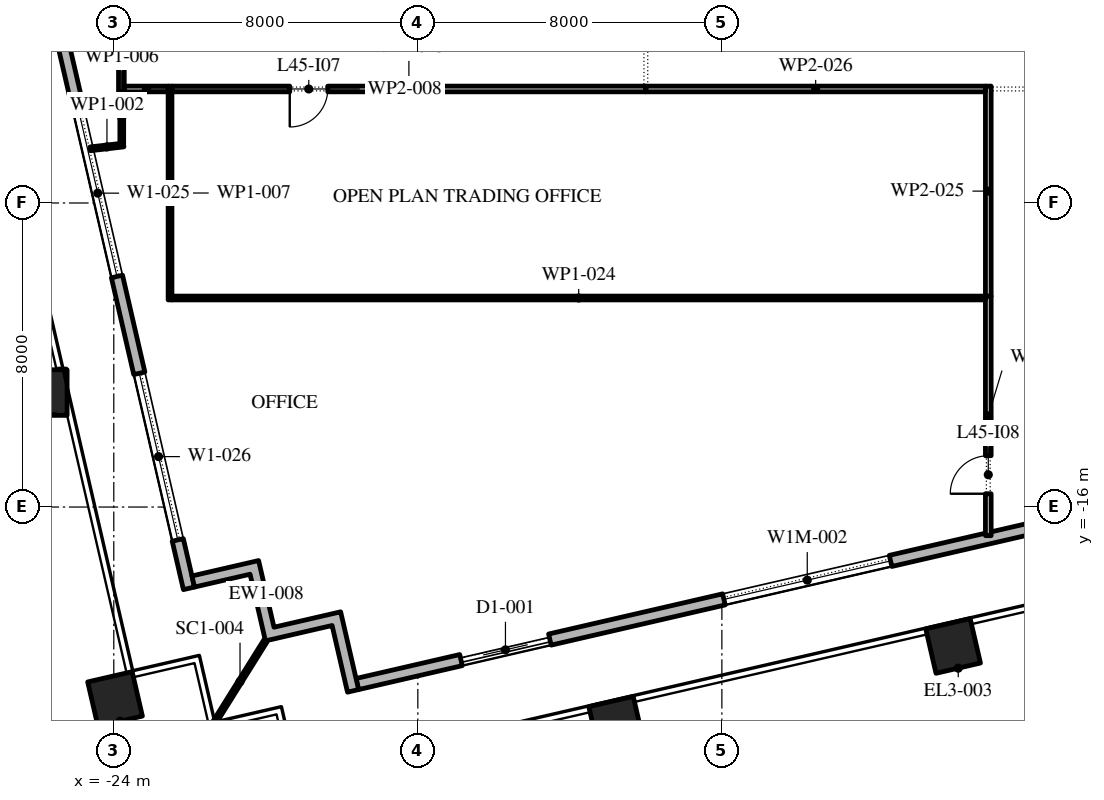
"""IFC4 building model, lengths in metres.
Left out: names, types, materials, properties, quantities, classifications, styles, units other than length and angle.
Written with IfcOpenShell. Run it as: python <this file> out.ifc"""

import sys

from ifc_helpers import new_model, si_unit, direction, frame, frame_2d, origin, origin_2d, place, context, subcontext, project, spatial, polyline, rectangle, outline, extrude, element, fill, save


model = new_model("IFC4")
c1 = context("Model", 3, precision=1e-05, world=origin(), true_north=direction((0.0, 1.0)))
c2 = subcontext(c1, "Body", "Model", "MODEL_VIEW")
j1 = project(units=[si_unit("LENGTHUNIT", "METRE"), si_unit("PLANEANGLEUNIT", "RADIAN")], contexts=[c1])
p1 = place(None, origin())
s1 = spatial("IfcSite", under=j1, at=p1, CompositionType="ELEMENT")
p2 = place(p1, origin())
s2 = spatial("IfcBuilding", under=s1, at=p2, CompositionType="ELEMENT")
p3 = place(p2, frame((0.0, 0.0, 205.2)))
s3 = spatial("IfcBuildingStorey", under=s2, at=p3, CompositionType="ELEMENT", Elevation=205.2)
for number, where, z_axis, x_axis in (
    (1, (-10.782, -21.702, 0.0), (0.0, 0.0, 1.0), (0.974, 0.225, 0.0)),
    (2, (-1.916, -19.655, 0.0), (0.0, 0.0, 1.0), (0.974, 0.225, 0.0)),
):
    element("IfcColumn", number, at=place(p3, frame(where, z_axis=z_axis, x_axis=x_axis)), inside=s3, PredefinedType="COLUMN", context=c2, shape_type="SweptSolid", body=[
        extrude(rectangle(XDim=1.2, YDim=1.2, at=origin_2d()), origin(), (0.0, 0.0, 1.0), 4.2),
    ])
p4 = place(p3, frame((-25.828, -12.988, 0.0), z_axis=(-0.002731884952, 0.01168316756, 0.999928017609), x_axis=(-0.973733900744, -0.227689021567, 0.0)))
e3 = element("IfcColumn", 3, at=p4, inside=s3, PredefinedType="COLUMN", context=c2, shape_type="SweptSolid", body=[
    extrude(rectangle(XDim=1.2, YDim=1.2, at=origin_2d()), origin(), (0.0, 0.0, 1.0), 4.2),
])
p5 = place(p3, frame((-23.967, -21.051, 0.0), z_axis=(0.0, 0.0, 1.0), x_axis=(0.974370064785, 0.224951054344, 0.0)))
e4 = element("IfcColumn", 4, at=p5, inside=s3, PredefinedType="COLUMN", context=c2, shape_type="SweptSolid", body=[
    extrude(rectangle(XDim=1.2, YDim=1.2, at=origin_2d()), origin(), (0.0, 0.0, 1.0), 4.2),
])
p6 = place(p3, frame((-17.592, -20.657, 0.0), z_axis=(0.0, 0.0, 1.0), x_axis=(0.974370243697, 0.224950279389, 0.0)))
e5 = element("IfcWall", 5, at=p6, inside=s3, PredefinedType="STANDARD", context=c2, shape_type="SweptSolid", body=[
    extrude(rectangle(XDim=49.5, YDim=0.3, at=frame_2d((24.75, 0.0))), origin(), (0.0, 0.0, 1.0), 4.0),
])
p7 = place(p6, frame((2.8, 0.0, 0.0)))
e6 = element("IfcOpeningElement", 6, at=p7, cuts=e5, PredefinedType="OPENING", context=c2, shape_type="SweptSolid", body=[
    extrude(rectangle(XDim=2.4, YDim=3.5, at=frame_2d((1.2, 1.75))), frame((0.0, 0.16, 0.0), z_axis=(0.0, -1.0, 0.0), x_axis=(1.0, 0.0, 0.0)), (0.0, 0.0, 1.0), 0.32),
])
p8 = place(p6, frame((9.9, 0.0, 0.45)))
e7 = element("IfcOpeningElement", 7, at=p8, cuts=e5, PredefinedType="OPENING", context=c2, shape_type="SweptSolid", body=[
    extrude(rectangle(XDim=4.5, YDim=2.575, at=frame_2d((2.25, 1.288))), frame((0.0, 0.16, 0.0), z_axis=(0.0, -1.0, 0.0), x_axis=(1.0, 0.0, 0.0)), (0.0, 0.0, 1.0), 0.32),
])
p9 = place(p6, frame((18.2, 0.0, 0.45)))
e8 = element("IfcOpeningElement", 8, at=p9, cuts=e5, PredefinedType="OPENING", context=c2, shape_type="SweptSolid", body=[
    extrude(rectangle(XDim=4.5, YDim=3.05, at=frame_2d((2.25, 1.525))), frame((0.0, 0.16, 0.0), z_axis=(0.0, -1.0, 0.0), x_axis=(1.0, 0.0, 0.0)), (0.0, 0.0, 1.0), 0.32),
])
p10 = place(p6, frame((26.5, 0.0, 0.45)))
e9 = element("IfcOpeningElement", 9, at=p10, cuts=e5, PredefinedType="OPENING", context=c2, shape_type="SweptSolid", body=[
    extrude(rectangle(XDim=4.5, YDim=2.75, at=frame_2d((2.25, 1.375))), frame((0.0, 0.16, 0.0), z_axis=(0.0, -1.0, 0.0), x_axis=(1.0, 0.0, 0.0)), (0.0, 0.0, 1.0), 0.32),
])
p11 = place(p6, frame((36.8, 0.0, 0.0)))
e10 = element("IfcOpeningElement", 10, at=p11, cuts=e5, PredefinedType="OPENING", context=c2, shape_type="SweptSolid", body=[
    extrude(rectangle(XDim=2.4, YDim=3.275, at=frame_2d((1.2, 1.637))), frame((0.0, 0.16, 0.0), z_axis=(0.0, -1.0, 0.0), x_axis=(1.0, 0.0, 0.0)), (0.0, 0.0, 1.0), 0.32),
])
p12 = place(p6, frame((43.1, 0.0, 0.45)))
e11 = element("IfcOpeningElement", 11, at=p12, cuts=e5, PredefinedType="OPENING", context=c2, shape_type="SweptSolid", body=[
    extrude(rectangle(XDim=4.5, YDim=2.875, at=frame_2d((2.25, 1.438))), frame((0.0, 0.16, 0.0), z_axis=(0.0, -1.0, 0.0), x_axis=(1.0, 0.0, 0.0)), (0.0, 0.0, 1.0), 0.32),
])
p13 = place(p3, frame((-33.157, 30.092, 0.0), z_axis=(0.0, 0.0, 1.0), x_axis=(0.224950279389, -0.974370243697, 0.0)))
e12 = element("IfcWall", 12, at=p13, inside=s3, PredefinedType="STANDARD", context=c2, shape_type="SweptSolid", body=[
    extrude(rectangle(XDim=49.5, YDim=0.3, at=frame_2d((24.75, 0.0))), origin(), (0.0, 0.0, 1.0), 4.0),
])
p14 = place(p13, frame((2.207, 0.0, 0.0)))
e13 = element("IfcOpeningElement", 13, at=p14, cuts=e12, PredefinedType="OPENING", context=c2, shape_type="SweptSolid", body=[
    extrude(rectangle(XDim=2.4, YDim=3.5, at=frame_2d((1.2, 1.75))), frame((0.0, 0.16, 0.0), z_axis=(0.0, -1.0, 0.0), x_axis=(1.0, 0.0, 0.0)), (0.0, 0.0, 1.0), 0.32),
])
p15 = place(p13, frame((8.121, 0.0, 0.45)))
e14 = element("IfcOpeningElement", 14, at=p15, cuts=e12, PredefinedType="OPENING", context=c2, shape_type="SweptSolid", body=[
    extrude(rectangle(XDim=4.5, YDim=2.825, at=frame_2d((2.25, 1.413))), frame((0.0, 0.16, 0.0), z_axis=(0.0, -1.0, 0.0), x_axis=(1.0, 0.0, 0.0)), (0.0, 0.0, 1.0), 0.32),
])
p16 = place(p13, frame((15.236, 0.0, 0.45)))
e15 = element("IfcOpeningElement", 15, at=p16, cuts=e12, PredefinedType="OPENING", context=c2, shape_type="SweptSolid", body=[
    extrude(rectangle(XDim=4.5, YDim=2.95, at=frame_2d((2.25, 1.475))), frame((0.0, 0.16, 0.0), z_axis=(0.0, -1.0, 0.0), x_axis=(1.0, 0.0, 0.0)), (0.0, 0.0, 1.0), 0.32),
])
p17 = place(p13, frame((22.35, 0.0, 0.45)))
e16 = element("IfcOpeningElement", 16, at=p17, cuts=e12, PredefinedType="OPENING", context=c2, shape_type="SweptSolid", body=[
    extrude(rectangle(XDim=4.5, YDim=3.0, at=frame_2d((2.25, 1.5))), frame((0.0, 0.16, 0.0), z_axis=(0.0, -1.0, 0.0), x_axis=(1.0, 0.0, 0.0)), (0.0, 0.0, 1.0), 0.32),
])
p18 = place(p13, frame((30.514, 0.0, 0.0)))
e17 = element("IfcOpeningElement", 17, at=p18, cuts=e12, PredefinedType="OPENING", context=c2, shape_type="SweptSolid", body=[
    extrude(rectangle(XDim=2.4, YDim=3.5, at=frame_2d((1.2, 1.75))), frame((0.0, 0.16, 0.0), z_axis=(0.0, -1.0, 0.0), x_axis=(1.0, 0.0, 0.0)), (0.0, 0.0, 1.0), 0.32),
])
p19 = place(p13, frame((36.579, 0.0, 0.45)))
e18 = element("IfcOpeningElement", 18, at=p19, cuts=e12, PredefinedType="OPENING", context=c2, shape_type="SweptSolid", body=[
    extrude(rectangle(XDim=4.5, YDim=3.05, at=frame_2d((2.25, 1.525))), frame((0.0, 0.16, 0.0), z_axis=(0.0, -1.0, 0.0), x_axis=(1.0, 0.0, 0.0)), (0.0, 0.0, 1.0), 0.32),
])
p20 = place(p13, frame((43.693, 0.0, 0.45)))
e19 = element("IfcOpeningElement", 19, at=p20, cuts=e12, PredefinedType="OPENING", context=c2, shape_type="SweptSolid", body=[
    extrude(rectangle(XDim=4.5, YDim=3.05, at=frame_2d((2.25, 1.525))), frame((0.0, 0.16, 0.0), z_axis=(0.0, -1.0, 0.0), x_axis=(1.0, 0.0, 0.0)), (0.0, 0.0, 1.0), 0.32),
])
p21 = place(p3, origin())
e20 = element("IfcWall", 20, at=p21, inside=s3, PredefinedType="STANDARD", context=c2, shape_type="SweptSolid", body=[
    extrude(outline(polyline([(-18.256, -19.117), (-20.01, -19.522), (-20.414, -17.768), (-21.876, -18.105), (-21.943, -17.813), (-20.19, -17.408), (-19.785, -19.162), (-18.031, -18.757), (-17.558, -20.803), (-17.851, -20.871), (-18.256, -19.117)])), origin(), (0.0, 0.0, 1.0), 4.0),
])
p22 = place(p3, frame((-20.01, -19.522, -0.05), z_axis=(0.0, 0.0, 1.0), x_axis=(-0.529920736377, -0.848047176257, 0.0)))
e21 = element("IfcWall", 21, at=p22, inside=s3, PredefinedType="STANDARD", context=c2, shape_type="SweptSolid", body=[
    extrude(rectangle(XDim=2.526, YDim=0.1, at=frame_2d((1.263, 0.0))), origin(), (0.0, 0.0, 1.0), 4.05),
])
p23 = place(p3, frame((-24.62, -6.575, 0.0), z_axis=(0.0, 0.0, 1.0), x_axis=(0.993501545499, 0.113818623659, 0.0)))
e22 = element("IfcWall", 22, at=p23, inside=s3, PredefinedType="PARTITIONING", context=c2, shape_type="SweptSolid", body=[
    extrude(rectangle(XDim=0.886, YDim=0.1, at=frame_2d((0.443, 0.0))), origin(), (0.0, 0.0, 1.0), 4.0),
])
p24 = place(p3, frame((-23.8, -5.075, 0.0), z_axis=(0.0, 0.0, 1.0), x_axis=(0.0, 1.0, 0.0)))
e23 = element("IfcWall", 23, at=p24, inside=s3, PredefinedType="PARTITIONING", context=c2, shape_type="SweptSolid", body=[
    extrude(rectangle(XDim=27.335, YDim=0.15, at=frame_2d((13.667, 0.0))), origin(), (0.0, 0.0, 1.0), 4.0),
])
p25 = place(p24, frame((15.985, 0.0, 0.0)))
e24 = element("IfcOpeningElement", 24, at=p25, cuts=e23, PredefinedType="OPENING", context=c2, shape_type="SweptSolid", body=[
    extrude(rectangle(XDim=1.0, YDim=2.1, at=frame_2d((0.5, 1.05))), frame((0.0, 0.085, 0.0), z_axis=(0.0, -1.0, 0.0), x_axis=(1.0, 0.0, 0.0)), (0.0, 0.0, 1.0), 0.17),
])
p26 = place(p3, frame((-23.79, -5.075, 0.0), z_axis=(0.0, 0.0, 1.0), x_axis=(0.0, -1.0, 0.0)))
e25 = element("IfcWall", 25, at=p26, inside=s3, PredefinedType="PARTITIONING", context=c2, shape_type="SweptSolid", body=[
    extrude(rectangle(XDim=1.355, YDim=0.1, at=frame_2d((0.677, 0.0))), origin(), (0.0, 0.0, 1.0), 4.0),
])
p27 = place(p3, frame((-22.52, -10.55, 0.0), z_axis=(0.0, 0.0, 1.0), x_axis=(0.0, 1.0, 0.0)))
e26 = element("IfcWall", 26, at=p27, inside=s3, PredefinedType="PARTITIONING", context=c2, shape_type="SweptSolid", body=[
    extrude(rectangle(XDim=5.625, YDim=0.1, at=frame_2d((2.812, 0.0))), origin(), (0.0, 0.0, 1.0), 4.0),
])
p28 = place(p3, frame((-22.57, -5.0, 0.0), z_axis=(0.0, 0.0, 1.0), x_axis=(-1.0, 0.0, 0.0)))
e27 = element("IfcWall", 27, at=p28, inside=s3, PredefinedType="PARTITIONING", context=c2, shape_type="SweptSolid", body=[
    extrude(rectangle(XDim=1.145, YDim=0.15, at=frame_2d((0.573, 0.0))), origin(), (0.0, 0.0, 1.0), 4.0),
])
p29 = place(p3, frame((-10.0, -5.0, 0.0), z_axis=(0.0, 0.0, 1.0), x_axis=(-1.0, 0.0, 0.0)))
e28 = element("IfcWall", 28, at=p29, inside=s3, PredefinedType="PARTITIONING", context=c2, shape_type="SweptSolid", body=[
    extrude(rectangle(XDim=12.47, YDim=0.15, at=frame_2d((6.235, 0.0))), origin(), (0.0, 0.0, 1.0), 4.0),
])
p30 = place(p29, frame((8.37, 0.0, 0.0)))
e29 = element("IfcOpeningElement", 29, at=p30, cuts=e28, PredefinedType="OPENING", context=c2, shape_type="SweptSolid", body=[
    extrude(rectangle(XDim=1.0, YDim=2.1, at=frame_2d((0.5, 1.05))), frame((0.0, 0.085, 0.0), z_axis=(0.0, -1.0, 0.0), x_axis=(1.0, 0.0, 0.0)), (0.0, 0.0, 1.0), 0.17),
])
p31 = place(p3, frame((-0.99, -16.753, 0.0), z_axis=(0.0, 0.0, 1.0), x_axis=(0.0, 1.0, 0.0)))
e30 = element("IfcWall", 30, at=p31, inside=s3, PredefinedType="PARTITIONING", context=c2, shape_type="SweptSolid", body=[
    extrude(rectangle(XDim=6.303, YDim=0.15, at=frame_2d((3.151, 0.0))), origin(), (0.0, 0.0, 1.0), 4.0),
])
p32 = place(p31, frame((1.103, 0.0, 0.0)))
e31 = element("IfcOpeningElement", 31, at=p32, cuts=e30, PredefinedType="OPENING", context=c2, shape_type="SweptSolid", body=[
    extrude(rectangle(XDim=1.0, YDim=2.1, at=frame_2d((0.5, 1.05))), frame((0.0, 0.085, 0.0), z_axis=(0.0, -1.0, 0.0), x_axis=(1.0, 0.0, 0.0)), (0.0, 0.0, 1.0), 0.17),
])
p33 = place(p3, frame((-1.065, -10.5, 0.0), z_axis=(0.0, 0.0, 1.0), x_axis=(-1.0, 0.0, 0.0)))
e32 = element("IfcWall", 32, at=p33, inside=s3, PredefinedType="PARTITIONING", context=c2, shape_type="SweptSolid", body=[
    extrude(rectangle(XDim=21.405, YDim=0.1, at=frame_2d((10.703, 0.0))), origin(), (0.0, 0.0, 1.0), 4.0),
])
p34 = place(p3, frame((-0.99, -10.45, 0.0), z_axis=(0.0, 0.0, 1.0), x_axis=(0.0, 1.0, 0.0)))
e33 = element("IfcWall", 33, at=p34, inside=s3, PredefinedType="PARTITIONING", context=c2, shape_type="SweptSolid", body=[
    extrude(rectangle(XDim=5.525, YDim=0.15, at=frame_2d((2.762, 0.0))), origin(), (0.0, 0.0, 1.0), 4.0),
])
p35 = place(p3, frame((-1.065, -5.0, 0.0), z_axis=(0.0, 0.0, 1.0), x_axis=(-1.0, 0.0, 0.0)))
e34 = element("IfcWall", 34, at=p35, inside=s3, PredefinedType="PARTITIONING", context=c2, shape_type="SweptSolid", body=[
    extrude(rectangle(XDim=8.935, YDim=0.15, at=frame_2d((4.468, 0.0))), origin(), (0.0, 0.0, 1.0), 4.0),
])
p36 = place(p7, origin())
e35 = element("IfcDoor", 35, at=p36, inside=s3, OperationType="DOUBLE_DOOR_SLIDING", PredefinedType="DOOR", context=c2, shape_type="SweptSolid", body=[
    extrude(rectangle(XDim=2.4, YDim=3.5, at=frame_2d((1.2, 1.75))), frame((0.0, 0.025, 0.0), z_axis=(0.0, -1.0, 0.0), x_axis=(1.0, 0.0, 0.0)), (0.0, 0.0, 1.0), 0.05),
])
fill(e6, e35)
p37 = place(p8, origin())
e36 = element("IfcWindow", 36, at=p37, inside=s3, PartitioningType="DOUBLE_PANEL_VERTICAL", PredefinedType="WINDOW", context=c2, shape_type="SweptSolid", body=[
    extrude(rectangle(XDim=4.5, YDim=2.575, at=frame_2d((2.25, 1.288))), frame((0.0, 0.03, 0.0), z_axis=(0.0, -1.0, 0.0), x_axis=(1.0, 0.0, 0.0)), (0.0, 0.0, 1.0), 0.06),
])
fill(e7, e36)
p38 = place(p19, origin())
e37 = element("IfcWindow", 37, at=p38, inside=s3, PartitioningType="DOUBLE_PANEL_VERTICAL", PredefinedType="WINDOW", context=c2, shape_type="SweptSolid", body=[
    extrude(rectangle(XDim=4.5, YDim=3.05, at=frame_2d((2.25, 1.525))), frame((0.0, 0.03, 0.0), z_axis=(0.0, -1.0, 0.0), x_axis=(1.0, 0.0, 0.0)), (0.0, 0.0, 1.0), 0.06),
])
fill(e18, e37)
p39 = place(p20, origin())
e38 = element("IfcWindow", 38, at=p39, inside=s3, PartitioningType="DOUBLE_PANEL_VERTICAL", PredefinedType="WINDOW", context=c2, shape_type="SweptSolid", body=[
    extrude(rectangle(XDim=4.5, YDim=3.05, at=frame_2d((2.25, 1.525))), frame((0.0, 0.03, 0.0), z_axis=(0.0, -1.0, 0.0), x_axis=(1.0, 0.0, 0.0)), (0.0, 0.0, 1.0), 0.06),
])
fill(e19, e38)
p40 = place(p30, origin())
e39 = element("IfcDoor", 39, at=p40, inside=s3, OperationType="SINGLE_SWING_LEFT", PredefinedType="DOOR", context=c2, shape_type="SweptSolid", body=[
    extrude(rectangle(XDim=1.0, YDim=2.1, at=frame_2d((0.5, 1.05))), frame((0.0, 0.025, 0.0), z_axis=(0.0, -1.0, 0.0), x_axis=(1.0, 0.0, 0.0)), (0.0, 0.0, 1.0), 0.05),
])
fill(e29, e39)
p41 = place(p32, origin())
e40 = element("IfcDoor", 40, at=p41, inside=s3, OperationType="SINGLE_SWING_RIGHT", PredefinedType="DOOR", context=c2, shape_type="SweptSolid", body=[
    extrude(rectangle(XDim=1.0, YDim=2.1, at=frame_2d((0.5, 1.05))), frame((0.0, 0.025, 0.0), z_axis=(0.0, -1.0, 0.0), x_axis=(1.0, 0.0, 0.0)), (0.0, 0.0, 1.0), 0.05),
])
fill(e31, e40)
save(model, sys.argv[1])
